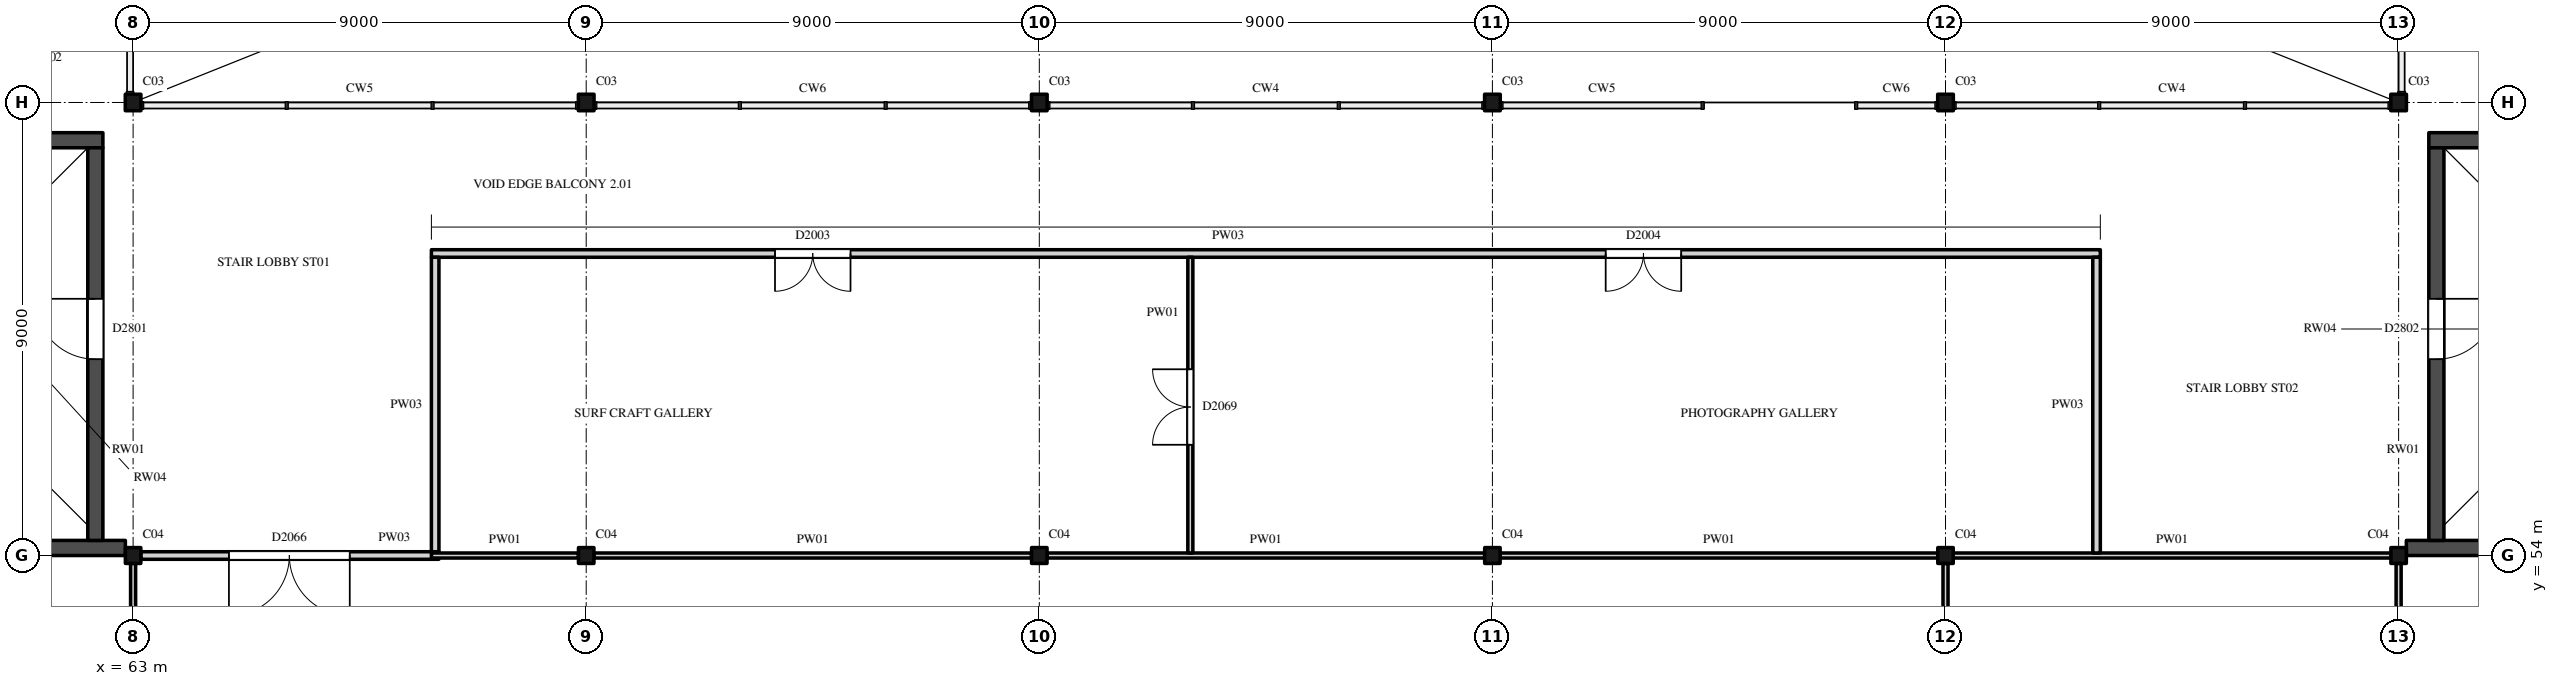
"""IFC4 building model, lengths in metres.
Left out: names, types, materials, properties, quantities, classifications, styles, units other than length and angle.
Written with IfcOpenShell. Run it as: python <this file> out.ifc"""

import sys

from ifc_helpers import new_model, si_unit, direction, frame, frame_2d, origin, origin_2d, place, context, subcontext, project, spatial, rectangle, i_section, extrude, element, fill, save


model = new_model("IFC4")
c1 = context("Model", 3, precision=1e-05, world=origin(), true_north=direction((0.0, 1.0)))
c2 = subcontext(c1, "Body", "Model", "MODEL_VIEW")
j1 = project(units=[si_unit("LENGTHUNIT", "METRE"), si_unit("PLANEANGLEUNIT", "RADIAN")], contexts=[c1])
p1 = place(None, origin())
s1 = spatial("IfcSite", under=j1, at=p1, CompositionType="ELEMENT")
p2 = place(p1, origin())
s2 = spatial("IfcBuilding", under=s1, at=p2, CompositionType="ELEMENT")
p3 = place(p2, frame((0.0, 0.0, 11.0)))
s3 = spatial("IfcBuildingStorey", under=s2, at=p3, CompositionType="ELEMENT", Elevation=11.0)
for number, where, z_axis, x_axis in (
    (1, (63.0, 54.0, 0.0), (0.0, 0.0, 1.0), (1.0, 0.0, 0.0)),
    (2, (72.0, 54.0, 0.0), (0.0, 0.0, 1.0), (1.0, 0.0, 0.0)),
    (3, (81.0, 54.0, 0.0), (0.0, 0.0, 1.0), (1.0, 0.0, 0.0)),
    (4, (90.0, 54.0, 0.0), (0.0, 0.0, 1.0), (1.0, 0.0, 0.0)),
    (5, (99.0, 54.0, 0.0), (0.0, 0.0, 1.0), (1.0, 0.0, 0.0)),
    (6, (108.0, 54.0, 0.0), (0.0, 0.0, 1.0), (1.0, 0.0, 0.0)),
):
    element("IfcColumn", number, at=place(p3, frame(where, z_axis=z_axis, x_axis=x_axis)), inside=s3, PredefinedType="COLUMN", context=c2, shape_type="SweptSolid", body=[
        extrude(i_section(OverallWidth=0.307, OverallDepth=0.315, WebThickness=0.012, FlangeThickness=0.019, FilletRadius=0.017, at=origin_2d()), origin(), (0.0, 0.0, 1.0), 5.0),
    ])
for number, where, z_axis, x_axis in (
    (7, (63.0, 63.0, 0.0), (0.0, 0.0, 1.0), (1.0, 0.0, 0.0)),
    (8, (72.0, 63.0, 0.0), (0.0, 0.0, 1.0), (1.0, 0.0, 0.0)),
    (9, (81.0, 63.0, 0.0), (0.0, 0.0, 1.0), (1.0, 0.0, 0.0)),
    (10, (90.0, 63.0, 0.0), (0.0, 0.0, 1.0), (1.0, 0.0, 0.0)),
    (11, (99.0, 63.0, 0.0), (0.0, 0.0, 1.0), (1.0, 0.0, 0.0)),
    (12, (108.0, 63.0, 0.0), (0.0, 0.0, 1.0), (1.0, 0.0, 0.0)),
):
    element("IfcColumn", number, at=place(p3, frame(where, z_axis=z_axis, x_axis=x_axis)), inside=s3, PredefinedType="COLUMN", context=c2, shape_type="SweptSolid", body=[
        extrude(i_section(OverallWidth=0.311, OverallDepth=0.327, WebThickness=0.016, FlangeThickness=0.025, FilletRadius=0.017, at=origin_2d()), origin(), (0.0, 0.0, 1.0), 5.0),
    ])
p4 = place(p3, frame((54.3, 54.15, 0.0), z_axis=(0.0, 0.0, 1.0), x_axis=(1.0, 0.0, 0.0)))
e13 = element("IfcWall", 13, at=p4, inside=s3, PredefinedType="SHEAR", context=c2, shape_type="SweptSolid", body=[
    extrude(rectangle(XDim=8.546, YDim=0.3, at=frame_2d((4.273, 0.0))), origin(), (0.0, 0.0, 1.0), 5.0),
])
p5 = place(p3, frame((54.3, 62.25, 0.0), z_axis=(0.0, 0.0, 1.0), x_axis=(1.0, 0.0, 0.0)))
e14 = element("IfcWall", 14, at=p5, inside=s3, PredefinedType="SHEAR", context=c2, shape_type="SweptSolid", body=[
    extrude(rectangle(XDim=8.1, YDim=0.3, at=frame_2d((4.05, 0.0))), origin(), (0.0, 0.0, 1.0), 5.0),
])
p6 = place(p3, frame((62.25, 54.3, 0.0), z_axis=(0.0, 0.0, 1.0), x_axis=(0.0, 1.0, 0.0)))
e15 = element("IfcWall", 15, at=p6, inside=s3, PredefinedType="SHEAR", context=c2, shape_type="SweptSolid", body=[
    extrude(rectangle(XDim=7.8, YDim=0.3, at=frame_2d((3.9, 0.0))), origin(), (0.0, 0.0, 1.0), 5.0),
])
p7 = place(p6, frame((3.6, 0.0, 0.0)))
e16 = element("IfcOpeningElement", 16, at=p7, cuts=e15, PredefinedType="OPENING", context=c2, shape_type="SweptSolid", body=[
    extrude(rectangle(XDim=1.2, YDim=2.1, at=frame_2d((0.6, 1.05))), frame((0.0, 0.16, 0.0), z_axis=(0.0, -1.0, 0.0), x_axis=(1.0, 0.0, 0.0)), (0.0, 0.0, 1.0), 0.32),
])
p8 = place(p3, frame((108.154, 54.15, 0.0), z_axis=(0.0, 0.0, 1.0), x_axis=(1.0, 0.0, 0.0)))
e17 = element("IfcWall", 17, at=p8, inside=s3, PredefinedType="SHEAR", context=c2, shape_type="SweptSolid", body=[
    extrude(rectangle(XDim=8.546, YDim=0.3, at=frame_2d((4.273, 0.0))), origin(), (0.0, 0.0, 1.0), 5.0),
])
p9 = place(p3, frame((108.6, 62.25, 0.0), z_axis=(0.0, 0.0, 1.0), x_axis=(1.0, 0.0, 0.0)))
e18 = element("IfcWall", 18, at=p9, inside=s3, PredefinedType="SHEAR", context=c2, shape_type="SweptSolid", body=[
    extrude(rectangle(XDim=8.1, YDim=0.3, at=frame_2d((4.05, 0.0))), origin(), (0.0, 0.0, 1.0), 5.0),
])
p10 = place(p3, frame((108.75, 54.3, 0.0), z_axis=(0.0, 0.0, 1.0), x_axis=(0.0, 1.0, 0.0)))
e19 = element("IfcWall", 19, at=p10, inside=s3, PredefinedType="SHEAR", context=c2, shape_type="SweptSolid", body=[
    extrude(rectangle(XDim=7.8, YDim=0.3, at=frame_2d((3.9, 0.0))), origin(), (0.0, 0.0, 1.0), 5.0),
])
p11 = place(p10, frame((3.6, 0.0, 0.0)))
e20 = element("IfcOpeningElement", 20, at=p11, cuts=e19, PredefinedType="OPENING", context=c2, shape_type="SweptSolid", body=[
    extrude(rectangle(XDim=1.2, YDim=2.1, at=frame_2d((0.6, 1.05))), frame((0.0, 0.16, 0.0), z_axis=(0.0, -1.0, 0.0), x_axis=(1.0, 0.0, 0.0)), (0.0, 0.0, 1.0), 0.32),
])
p12 = place(p3, frame((63.154, 54.0, 0.0), z_axis=(0.0, 0.0, 1.0), x_axis=(1.0, 0.0, 0.0)))
e21 = element("IfcWall", 21, at=p12, inside=s3, PredefinedType="PARTITIONING", context=c2, shape_type="SweptSolid", body=[
    extrude(rectangle(XDim=5.921, YDim=0.15, at=frame_2d((2.961, 0.0))), origin(), (0.0, 0.0, 1.0), 4.469),
])
p13 = place(p12, frame((1.75, 0.0, 0.0)))
e22 = element("IfcOpeningElement", 22, at=p13, cuts=e21, PredefinedType="OPENING", context=c2, shape_type="SweptSolid", body=[
    extrude(rectangle(XDim=2.4, YDim=3.0, at=frame_2d((1.2, 1.5))), frame((0.0, 0.085, 0.0), z_axis=(0.0, -1.0, 0.0), x_axis=(1.0, 0.0, 0.0)), (0.0, 0.0, 1.0), 0.17),
])
p14 = place(p3, frame((68.925, 54.0, 0.0), z_axis=(0.0, 0.0, 1.0), x_axis=(1.0, 0.0, 0.0)))
e23 = element("IfcWall", 23, at=p14, inside=s3, PredefinedType="PARTITIONING", context=c2, shape_type="SweptSolid", body=[
    extrude(rectangle(XDim=2.921, YDim=0.1, at=frame_2d((1.461, 0.0))), origin(), (0.0, 0.0, 1.0), 4.469),
])
for number, where, z_axis, x_axis in (
    (24, (72.154, 54.0, 0.0), (0.0, 0.0, 1.0), (1.0, 0.0, 0.0)),
    (25, (81.154, 54.0, 0.0), (0.0, 0.0, 1.0), (1.0, 0.0, 0.0)),
    (26, (90.154, 54.0, 0.0), (0.0, 0.0, 1.0), (1.0, 0.0, 0.0)),
    (27, (99.154, 54.0, 0.0), (0.0, 0.0, 1.0), (1.0, 0.0, 0.0)),
):
    element("IfcWall", number, at=place(p3, frame(where, z_axis=z_axis, x_axis=x_axis)), inside=s3, PredefinedType="PARTITIONING", context=c2, shape_type="SweptSolid", body=[
        extrude(rectangle(XDim=8.693, YDim=0.1, at=frame_2d((4.346, 0.0))), origin(), (0.0, 0.0, 1.0), 4.469),
    ])
p15 = place(p3, frame((68.925, 60.0, 0.0), z_axis=(0.0, 0.0, 1.0), x_axis=(1.0, 0.0, 0.0)))
e28 = element("IfcWall", 28, at=p15, inside=s3, PredefinedType="PARTITIONING", context=c2, shape_type="SweptSolid", body=[
    extrude(rectangle(XDim=33.15, YDim=0.15, at=frame_2d((16.575, 0.0))), origin(), (0.0, 0.0, 1.0), 4.469),
])
p16 = place(p15, frame((6.825, 0.0, 0.0)))
e29 = element("IfcOpeningElement", 29, at=p16, cuts=e28, PredefinedType="OPENING", context=c2, shape_type="SweptSolid", body=[
    extrude(rectangle(XDim=1.5, YDim=2.4, at=frame_2d((0.75, 1.2))), frame((0.0, 0.085, 0.0), z_axis=(0.0, -1.0, 0.0), x_axis=(1.0, 0.0, 0.0)), (0.0, 0.0, 1.0), 0.17),
])
p17 = place(p15, frame((23.325, 0.0, 0.0)))
e30 = element("IfcOpeningElement", 30, at=p17, cuts=e28, PredefinedType="OPENING", context=c2, shape_type="SweptSolid", body=[
    extrude(rectangle(XDim=1.5, YDim=2.4, at=frame_2d((0.75, 1.2))), frame((0.0, 0.085, 0.0), z_axis=(0.0, -1.0, 0.0), x_axis=(1.0, 0.0, 0.0)), (0.0, 0.0, 1.0), 0.17),
])
p18 = place(p3, frame((63.0, 45.157, 0.0), z_axis=(0.0, 0.0, 1.0), x_axis=(0.0, 1.0, 0.0)))
e31 = element("IfcWall", 31, at=p18, inside=s3, PredefinedType="PARTITIONING", context=c2, shape_type="SweptSolid", body=[
    extrude(rectangle(XDim=8.686, YDim=0.1, at=frame_2d((4.343, 0.0))), origin(), (0.0, 0.0, 1.0), 4.297),
])
p19 = place(p18, frame((3.65, 0.0, 0.0)))
e32 = element("IfcOpeningElement", 32, at=p19, cuts=e31, PredefinedType="OPENING", context=c2, shape_type="SweptSolid", body=[
    extrude(rectangle(XDim=1.35, YDim=2.4, at=frame_2d((0.675, 1.2))), frame((0.0, 0.06, 0.0), z_axis=(0.0, -1.0, 0.0), x_axis=(1.0, 0.0, 0.0)), (0.0, 0.0, 1.0), 0.12),
])
p20 = place(p3, frame((69.0, 54.075, 0.0), z_axis=(0.0, 0.0, 1.0), x_axis=(0.0, 1.0, 0.0)))
e33 = element("IfcWall", 33, at=p20, inside=s3, PredefinedType="PARTITIONING", context=c2, shape_type="SweptSolid", body=[
    extrude(rectangle(XDim=5.85, YDim=0.15, at=frame_2d((2.925, 0.0))), origin(), (0.0, 0.0, 1.0), 4.825),
])
p21 = place(p3, frame((84.0, 54.05, 0.0), z_axis=(0.0, 0.0, 1.0), x_axis=(0.0, 1.0, 0.0)))
e34 = element("IfcWall", 34, at=p21, inside=s3, PredefinedType="PARTITIONING", context=c2, shape_type="SweptSolid", body=[
    extrude(rectangle(XDim=5.875, YDim=0.1, at=frame_2d((2.938, 0.0))), origin(), (0.0, 0.0, 1.0), 4.825),
])
p22 = place(p21, frame((2.15, 0.0, 0.0)))
e35 = element("IfcOpeningElement", 35, at=p22, cuts=e34, PredefinedType="OPENING", context=c2, shape_type="SweptSolid", body=[
    extrude(rectangle(XDim=1.5, YDim=2.4, at=frame_2d((0.75, 1.2))), frame((0.0, 0.06, 0.0), z_axis=(0.0, -1.0, 0.0), x_axis=(1.0, 0.0, 0.0)), (0.0, 0.0, 1.0), 0.12),
])
p23 = place(p3, frame((99.0, 45.157, 0.0), z_axis=(0.0, 0.0, 1.0), x_axis=(0.0, 1.0, 0.0)))
e36 = element("IfcWall", 36, at=p23, inside=s3, PredefinedType="PARTITIONING", context=c2, shape_type="SweptSolid", body=[
    extrude(rectangle(XDim=8.686, YDim=0.1, at=frame_2d((4.343, 0.0))), origin(), (0.0, 0.0, 1.0), 4.297),
])
p24 = place(p3, frame((102.0, 54.05, 0.0), z_axis=(0.0, 0.0, 1.0), x_axis=(0.0, 1.0, 0.0)))
e37 = element("IfcWall", 37, at=p24, inside=s3, PredefinedType="PARTITIONING", context=c2, shape_type="SweptSolid", body=[
    extrude(rectangle(XDim=5.875, YDim=0.15, at=frame_2d((2.938, 0.0))), origin(), (0.0, 0.0, 1.0), 4.825),
])
p25 = place(p3, frame((108.0, 45.157, 0.0), z_axis=(0.0, 0.0, 1.0), x_axis=(0.0, 1.0, 0.0)))
e38 = element("IfcWall", 38, at=p25, inside=s3, PredefinedType="PARTITIONING", context=c2, shape_type="SweptSolid", body=[
    extrude(rectangle(XDim=8.686, YDim=0.1, at=frame_2d((4.343, 0.0))), origin(), (0.0, 0.0, 1.0), 4.297),
])
p26 = place(p25, frame((3.65, 0.0, 0.0)))
e39 = element("IfcOpeningElement", 39, at=p26, cuts=e38, PredefinedType="OPENING", context=c2, shape_type="SweptSolid", body=[
    extrude(rectangle(XDim=1.35, YDim=2.4, at=frame_2d((0.675, 1.2))), frame((0.0, 0.06, 0.0), z_axis=(0.0, -1.0, 0.0), x_axis=(1.0, 0.0, 0.0)), (0.0, 0.0, 1.0), 0.12),
])
p27 = place(p7, origin())
e40 = element("IfcDoor", 40, at=p27, inside=s3, OperationType="SINGLE_SWING_LEFT", PredefinedType="DOOR", context=c2, shape_type="SweptSolid", body=[
    extrude(rectangle(XDim=1.2, YDim=2.1, at=frame_2d((0.6, 1.05))), frame((0.0, 0.025, 0.0), z_axis=(0.0, -1.0, 0.0), x_axis=(1.0, 0.0, 0.0)), (0.0, 0.0, 1.0), 0.05),
])
fill(e16, e40)
p28 = place(p11, origin())
e41 = element("IfcDoor", 41, at=p28, inside=s3, OperationType="SINGLE_SWING_RIGHT", PredefinedType="DOOR", context=c2, shape_type="SweptSolid", body=[
    extrude(rectangle(XDim=1.2, YDim=2.1, at=frame_2d((0.6, 1.05))), frame((0.0, 0.025, 0.0), z_axis=(0.0, -1.0, 0.0), x_axis=(1.0, 0.0, 0.0)), (0.0, 0.0, 1.0), 0.05),
])
fill(e20, e41)
p29 = place(p16, origin())
e42 = element("IfcDoor", 42, at=p29, inside=s3, OperationType="DOUBLE_DOOR_SINGLE_SWING", PredefinedType="DOOR", context=c2, shape_type="SweptSolid", body=[
    extrude(rectangle(XDim=1.5, YDim=2.4, at=frame_2d((0.75, 1.2))), frame((0.0, 0.025, 0.0), z_axis=(0.0, -1.0, 0.0), x_axis=(1.0, 0.0, 0.0)), (0.0, 0.0, 1.0), 0.05),
])
fill(e29, e42)
p30 = place(p17, origin())
e43 = element("IfcDoor", 43, at=p30, inside=s3, OperationType="DOUBLE_DOOR_SINGLE_SWING", PredefinedType="DOOR", context=c2, shape_type="SweptSolid", body=[
    extrude(rectangle(XDim=1.5, YDim=2.4, at=frame_2d((0.75, 1.2))), frame((0.0, 0.025, 0.0), z_axis=(0.0, -1.0, 0.0), x_axis=(1.0, 0.0, 0.0)), (0.0, 0.0, 1.0), 0.05),
])
fill(e30, e43)
p31 = place(p13, origin())
e44 = element("IfcDoor", 44, at=p31, inside=s3, OperationType="DOUBLE_DOOR_SINGLE_SWING", PredefinedType="DOOR", context=c2, shape_type="SweptSolid", body=[
    extrude(rectangle(XDim=2.4, YDim=3.0, at=frame_2d((1.2, 1.5))), frame((0.0, 0.025, 0.0), z_axis=(0.0, -1.0, 0.0), x_axis=(1.0, 0.0, 0.0)), (0.0, 0.0, 1.0), 0.05),
])
fill(e22, e44)
p32 = place(p22, origin())
e45 = element("IfcDoor", 45, at=p32, inside=s3, OperationType="DOUBLE_DOOR_SINGLE_SWING", PredefinedType="DOOR", context=c2, shape_type="SweptSolid", body=[
    extrude(rectangle(XDim=1.5, YDim=2.4, at=frame_2d((0.75, 1.2))), frame((0.0, 0.025, 0.0), z_axis=(0.0, -1.0, 0.0), x_axis=(1.0, 0.0, 0.0)), (0.0, 0.0, 1.0), 0.05),
])
fill(e35, e45)
save(model, sys.argv[1])
